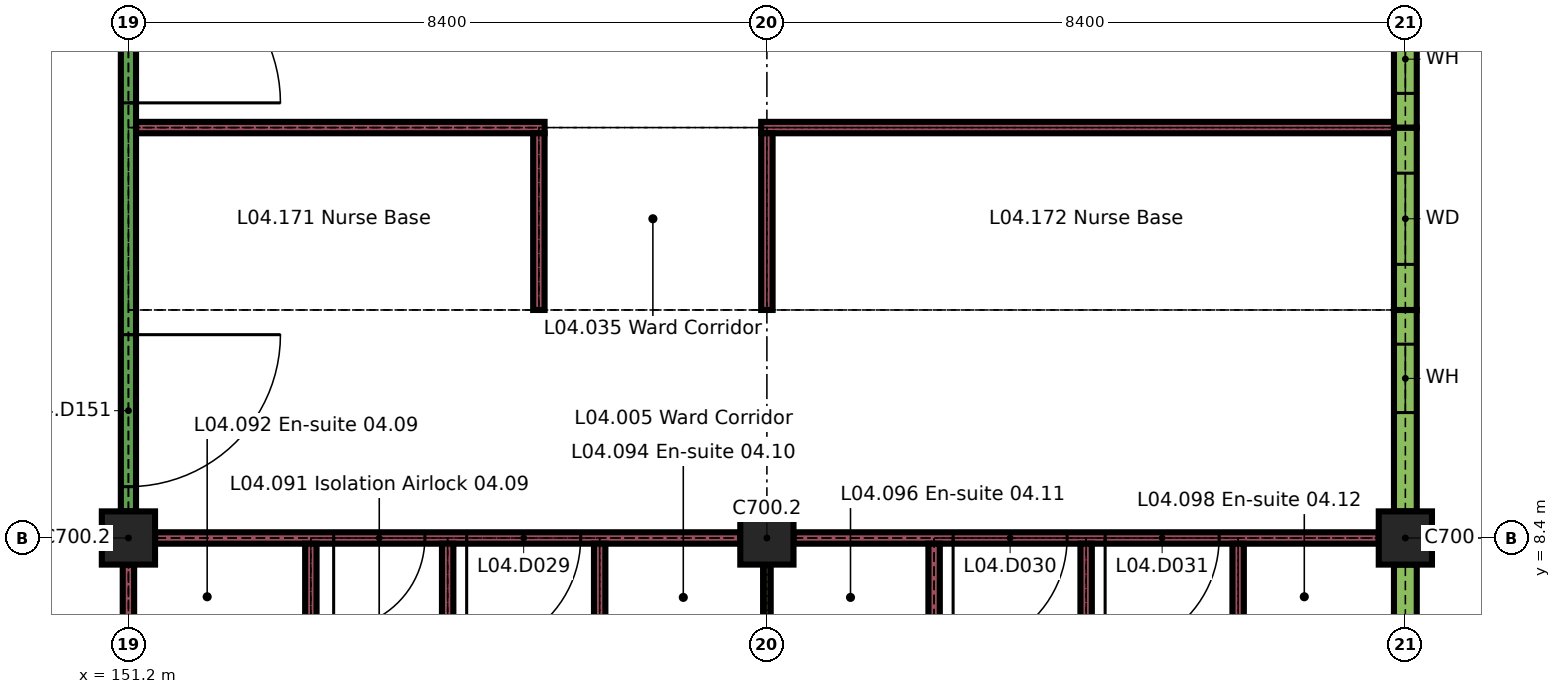
"""IFC4 building model, lengths in metres.
Left out: names, types, materials, properties, quantities, classifications, styles, units other than length and angle.
Written with IfcOpenShell. Run it as: python <this file> out.ifc"""

import sys

from ifc_helpers import new_model, si_unit, direction, frame, frame_2d, origin, origin_2d, place, context, subcontext, project, spatial, rectangle, extrude, element, fill, save


model = new_model("IFC4")
c1 = context("Model", 3, precision=1e-05, world=origin(), true_north=direction((0.0, 1.0)))
c2 = subcontext(c1, "Body", "Model", "MODEL_VIEW")
j1 = project(units=[si_unit("LENGTHUNIT", "METRE"), si_unit("PLANEANGLEUNIT", "RADIAN")], contexts=[c1])
p1 = place(None, origin())
s1 = spatial("IfcSite", under=j1, at=p1, CompositionType="ELEMENT")
p2 = place(p1, origin())
s2 = spatial("IfcBuilding", under=s1, at=p2, CompositionType="ELEMENT")
p3 = place(p2, frame((0.0, 0.0, 18.9)))
s3 = spatial("IfcBuildingStorey", under=s2, at=p3, CompositionType="ELEMENT", Elevation=18.9)
for number, where, z_axis, x_axis in (
    (1, (151.2, 8.4, 0.0), (0.0, 0.0, 1.0), (1.0, 0.0, 0.0)),
    (2, (159.6, 8.4, 0.0), (0.0, 0.0, 1.0), (1.0, 0.0, 0.0)),
    (3, (168.0, 8.4, 0.0), (0.0, 0.0, 1.0), (1.0, 0.0, 0.0)),
):
    element("IfcColumn", number, at=place(p3, frame(where, z_axis=z_axis, x_axis=x_axis)), inside=s3, PredefinedType="COLUMN", context=c2, shape_type="SweptSolid", body=[
        extrude(rectangle(XDim=0.7, YDim=0.7, at=origin_2d()), origin(), (0.0, 0.0, 1.0), 3.26),
    ])
p4 = place(p3, frame((168.0, 6.0, 0.0), z_axis=(0.0, 0.0, 1.0), x_axis=(0.0, 1.0, 0.0)))
e4 = element("IfcWall", 4, at=p4, inside=s3, PredefinedType="SOLIDWALL", context=c2, shape_type="SweptSolid", body=[
    extrude(rectangle(XDim=2.05, YDim=0.3, at=frame_2d((1.025, 0.0))), origin(), (0.0, 0.0, 1.0), 2.96),
])
p5 = place(p3, frame((168.0, 8.75, 0.0), z_axis=(0.0, 0.0, 1.0), x_axis=(0.0, 1.0, 0.0)))
e5 = element("IfcWall", 5, at=p5, inside=s3, PredefinedType="SOLIDWALL", context=c2, shape_type="SweptSolid", body=[
    extrude(rectangle(XDim=2.65, YDim=0.3, at=frame_2d((1.325, 0.0))), origin(), (0.0, 0.0, 1.0), 2.96),
])
p6 = place(p5, frame((1.3, 0.0, 0.9)))
e6 = element("IfcOpeningElement", 6, at=p6, cuts=e5, PredefinedType="OPENING", context=c2, shape_type="SweptSolid", body=[
    extrude(rectangle(XDim=0.9, YDim=1.5, at=frame_2d((0.45, 0.75))), frame((0.0, 0.16, 0.0), z_axis=(0.0, -1.0, 0.0), x_axis=(1.0, 0.0, 0.0)), (0.0, 0.0, 1.0), 0.32),
])
p7 = place(p3, frame((168.0, 11.4, 0.0), z_axis=(0.0, 0.0, 1.0), x_axis=(0.0, 1.0, 0.0)))
e7 = element("IfcWall", 7, at=p7, inside=s3, PredefinedType="SOLIDWALL", context=c2, shape_type="SweptSolid", body=[
    extrude(rectangle(XDim=2.4, YDim=0.3, at=frame_2d((1.2, 0.0))), origin(), (0.0, 0.0, 1.0), 2.96),
])
p8 = place(p7, frame((0.6, 0.0, 0.9)))
e8 = element("IfcOpeningElement", 8, at=p8, cuts=e7, PredefinedType="OPENING", context=c2, shape_type="SweptSolid", body=[
    extrude(rectangle(XDim=1.2, YDim=1.5, at=frame_2d((0.6, 0.75))), frame((0.0, 0.16, 0.0), z_axis=(0.0, -1.0, 0.0), x_axis=(1.0, 0.0, 0.0)), (0.0, 0.0, 1.0), 0.32),
])
p9 = place(p3, frame((168.0, 13.8, 0.0), z_axis=(0.0, 0.0, 1.0), x_axis=(0.0, 1.0, 0.0)))
e9 = element("IfcWall", 9, at=p9, inside=s3, PredefinedType="SOLIDWALL", context=c2, shape_type="SweptSolid", body=[
    extrude(rectangle(XDim=3.0, YDim=0.3, at=frame_2d((1.5, 0.0))), origin(), (0.0, 0.0, 1.0), 2.96),
])
p10 = place(p9, frame((0.45, 0.0, 0.9)))
e10 = element("IfcOpeningElement", 10, at=p10, cuts=e9, PredefinedType="OPENING", context=c2, shape_type="SweptSolid", body=[
    extrude(rectangle(XDim=0.9, YDim=1.5, at=frame_2d((0.45, 0.75))), frame((0.0, 0.16, 0.0), z_axis=(0.0, -1.0, 0.0), x_axis=(1.0, 0.0, 0.0)), (0.0, 0.0, 1.0), 0.32),
])
p11 = place(p3, frame((151.55, 8.4, 0.0), z_axis=(0.0, 0.0, 1.0), x_axis=(1.0, 0.0, 0.0)))
e11 = element("IfcWall", 11, at=p11, inside=s3, PredefinedType="PARTITIONING", context=c2, shape_type="SweptSolid", body=[
    extrude(rectangle(XDim=7.7, YDim=0.15, at=frame_2d((3.85, 0.0))), origin(), (0.0, 0.0, 1.0), 3.26),
])
p12 = place(p11, frame((2.35, 0.0, 0.0)))
e12 = element("IfcOpeningElement", 12, at=p12, cuts=e11, PredefinedType="OPENING", context=c2, shape_type="SweptSolid", body=[
    extrude(rectangle(XDim=1.2, YDim=2.1, at=frame_2d((0.6, 1.05))), frame((0.0, 0.085, 0.0), z_axis=(0.0, -1.0, 0.0), x_axis=(1.0, 0.0, 0.0)), (0.0, 0.0, 1.0), 0.17),
])
p13 = place(p11, frame((4.1, 0.0, 0.0)))
e13 = element("IfcOpeningElement", 13, at=p13, cuts=e11, PredefinedType="OPENING", context=c2, shape_type="SweptSolid", body=[
    extrude(rectangle(XDim=1.5, YDim=2.4, at=frame_2d((0.75, 1.2))), frame((0.0, 0.085, 0.0), z_axis=(0.0, -1.0, 0.0), x_axis=(1.0, 0.0, 0.0)), (0.0, 0.0, 1.0), 0.17),
])
p14 = place(p3, frame((159.95, 8.4, 0.0), z_axis=(0.0, 0.0, 1.0), x_axis=(1.0, 0.0, 0.0)))
e14 = element("IfcWall", 14, at=p14, inside=s3, PredefinedType="PARTITIONING", context=c2, shape_type="SweptSolid", body=[
    extrude(rectangle(XDim=7.7, YDim=0.15, at=frame_2d((3.85, 0.0))), origin(), (0.0, 0.0, 1.0), 3.26),
])
p15 = place(p14, frame((2.1, 0.0, 0.0)))
e15 = element("IfcOpeningElement", 15, at=p15, cuts=e14, PredefinedType="OPENING", context=c2, shape_type="SweptSolid", body=[
    extrude(rectangle(XDim=1.5, YDim=2.4, at=frame_2d((0.75, 1.2))), frame((0.0, 0.085, 0.0), z_axis=(0.0, -1.0, 0.0), x_axis=(1.0, 0.0, 0.0)), (0.0, 0.0, 1.0), 0.17),
])
p16 = place(p14, frame((4.1, 0.0, 0.0)))
e16 = element("IfcOpeningElement", 16, at=p16, cuts=e14, PredefinedType="OPENING", context=c2, shape_type="SweptSolid", body=[
    extrude(rectangle(XDim=1.5, YDim=2.4, at=frame_2d((0.75, 1.2))), frame((0.0, 0.085, 0.0), z_axis=(0.0, -1.0, 0.0), x_axis=(1.0, 0.0, 0.0)), (0.0, 0.0, 1.0), 0.17),
])
p17 = place(p3, frame((151.3, 13.8, 0.0), z_axis=(0.0, 0.0, 1.0), x_axis=(1.0, 0.0, 0.0)))
e17 = element("IfcWall", 17, at=p17, inside=s3, PredefinedType="PARTITIONING", context=c2, shape_type="SweptSolid", body=[
    extrude(rectangle(XDim=5.375, YDim=0.15, at=frame_2d((2.688, 0.0))), origin(), (0.0, 0.0, 1.0), 3.26),
])
p18 = place(p3, frame((159.525, 13.8, 0.0), z_axis=(0.0, 0.0, 1.0), x_axis=(1.0, 0.0, 0.0)))
e18 = element("IfcWall", 18, at=p18, inside=s3, PredefinedType="PARTITIONING", context=c2, shape_type="SweptSolid", body=[
    extrude(rectangle(XDim=8.325, YDim=0.15, at=frame_2d((4.163, 0.0))), origin(), (0.0, 0.0, 1.0), 3.26),
])
p19 = place(p3, frame((151.2, 0.35, 0.0), z_axis=(0.0, 0.0, 1.0), x_axis=(0.0, 1.0, 0.0)))
e19 = element("IfcWall", 19, at=p19, inside=s3, PredefinedType="PARTITIONING", context=c2, shape_type="SweptSolid", body=[
    extrude(rectangle(XDim=7.7, YDim=0.15, at=frame_2d((3.85, 0.0))), origin(), (0.0, 0.0, 1.0), 3.26),
])
p20 = place(p3, frame((151.2, 8.75, 0.0), z_axis=(0.0, 0.0, 1.0), x_axis=(0.0, 1.0, 0.0)))
e20 = element("IfcWall", 20, at=p20, inside=s3, PredefinedType="PARTITIONING", context=c2, shape_type="SweptSolid", body=[
    extrude(rectangle(XDim=7.7, YDim=0.2, at=frame_2d((3.85, 0.0))), origin(), (0.0, 0.0, 1.0), 3.26),
])
p21 = place(p20, frame((0.325, 0.0, 0.0)))
e21 = element("IfcOpeningElement", 21, at=p21, cuts=e20, PredefinedType="OPENING", context=c2, shape_type="SweptSolid", body=[
    extrude(rectangle(XDim=2.0, YDim=2.4, at=frame_2d((1.0, 1.2))), frame((0.0, 0.11, 0.0), z_axis=(0.0, -1.0, 0.0), x_axis=(1.0, 0.0, 0.0)), (0.0, 0.0, 1.0), 0.22),
])
p22 = place(p20, frame((5.375, 0.0, 0.0)))
e22 = element("IfcOpeningElement", 22, at=p22, cuts=e20, PredefinedType="OPENING", context=c2, shape_type="SweptSolid", body=[
    extrude(rectangle(XDim=2.0, YDim=2.4, at=frame_2d((1.0, 1.2))), frame((0.0, 0.11, 0.0), z_axis=(0.0, -1.0, 0.0), x_axis=(1.0, 0.0, 0.0)), (0.0, 0.0, 1.0), 0.22),
])
p23 = place(p3, frame((153.6, 6.075, 0.0), z_axis=(0.0, 0.0, 1.0), x_axis=(0.0, 1.0, 0.0)))
e23 = element("IfcWall", 23, at=p23, inside=s3, PredefinedType="PARTITIONING", context=c2, shape_type="SweptSolid", body=[
    extrude(rectangle(XDim=2.25, YDim=0.15, at=frame_2d((1.125, 0.0))), origin(), (0.0, 0.0, 1.0), 3.26),
])
p24 = place(p3, frame((155.4, 0.15, 0.0), z_axis=(0.0, 0.0, 1.0), x_axis=(0.0, 1.0, 0.0)))
e24 = element("IfcWall", 24, at=p24, inside=s3, PredefinedType="PARTITIONING", context=c2, shape_type="SweptSolid", body=[
    extrude(rectangle(XDim=8.175, YDim=0.15, at=frame_2d((4.087, 0.0))), origin(), (0.0, 0.0, 1.0), 3.26),
])
p25 = place(p3, frame((156.6, 11.4, 0.0), z_axis=(0.0, 0.0, 1.0), x_axis=(0.0, 1.0, 0.0)))
e25 = element("IfcWall", 25, at=p25, inside=s3, PredefinedType="PARTITIONING", context=c2, shape_type="SweptSolid", body=[
    extrude(rectangle(XDim=2.325, YDim=0.15, at=frame_2d((1.163, 0.0))), origin(), (0.0, 0.0, 1.0), 3.26),
])
p26 = place(p3, frame((157.4, 6.075, 0.0), z_axis=(0.0, 0.0, 1.0), x_axis=(0.0, 1.0, 0.0)))
e26 = element("IfcWall", 26, at=p26, inside=s3, PredefinedType="PARTITIONING", context=c2, shape_type="SweptSolid", body=[
    extrude(rectangle(XDim=2.25, YDim=0.15, at=frame_2d((1.125, 0.0))), origin(), (0.0, 0.0, 1.0), 3.26),
])
p27 = place(p3, frame((159.6, 6.075, 0.0), z_axis=(0.0, 0.0, 1.0), x_axis=(0.0, 1.0, 0.0)))
e27 = element("IfcWall", 27, at=p27, inside=s3, PredefinedType="PARTITIONING", context=c2, shape_type="SweptSolid", body=[
    extrude(rectangle(XDim=1.975, YDim=0.1, at=frame_2d((0.988, 0.0))), origin(), (0.0, 0.0, 1.0), 3.26),
])
p28 = place(p3, frame((159.6, 11.4, 0.0), z_axis=(0.0, 0.0, 1.0), x_axis=(0.0, 1.0, 0.0)))
e28 = element("IfcWall", 28, at=p28, inside=s3, PredefinedType="PARTITIONING", context=c2, shape_type="SweptSolid", body=[
    extrude(rectangle(XDim=2.325, YDim=0.15, at=frame_2d((1.163, 0.0))), origin(), (0.0, 0.0, 1.0), 3.26),
])
p29 = place(p3, frame((161.8, 6.075, 0.0), z_axis=(0.0, 0.0, 1.0), x_axis=(0.0, 1.0, 0.0)))
e29 = element("IfcWall", 29, at=p29, inside=s3, PredefinedType="PARTITIONING", context=c2, shape_type="SweptSolid", body=[
    extrude(rectangle(XDim=2.25, YDim=0.15, at=frame_2d((1.125, 0.0))), origin(), (0.0, 0.0, 1.0), 3.26),
])
p30 = place(p3, frame((163.8, 0.15, 0.0), z_axis=(0.0, 0.0, 1.0), x_axis=(0.0, 1.0, 0.0)))
e30 = element("IfcWall", 30, at=p30, inside=s3, PredefinedType="PARTITIONING", context=c2, shape_type="SweptSolid", body=[
    extrude(rectangle(XDim=8.175, YDim=0.15, at=frame_2d((4.087, 0.0))), origin(), (0.0, 0.0, 1.0), 3.26),
])
p31 = place(p3, frame((165.8, 6.075, 0.0), z_axis=(0.0, 0.0, 1.0), x_axis=(0.0, 1.0, 0.0)))
e31 = element("IfcWall", 31, at=p31, inside=s3, PredefinedType="PARTITIONING", context=c2, shape_type="SweptSolid", body=[
    extrude(rectangle(XDim=2.25, YDim=0.15, at=frame_2d((1.125, 0.0))), origin(), (0.0, 0.0, 1.0), 3.26),
])
p32 = place(p6, origin())
e32 = element("IfcWindow", 32, at=p32, inside=s3, PartitioningType="SINGLE_PANEL", PredefinedType="WINDOW", context=c2, shape_type="SweptSolid", body=[
    extrude(rectangle(XDim=0.9, YDim=1.5, at=frame_2d((0.45, 0.75))), frame((0.0, 0.03, 0.0), z_axis=(0.0, -1.0, 0.0), x_axis=(1.0, 0.0, 0.0)), (0.0, 0.0, 1.0), 0.06),
])
fill(e6, e32)
p33 = place(p8, origin())
e33 = element("IfcWindow", 33, at=p33, inside=s3, PartitioningType="SINGLE_PANEL", PredefinedType="WINDOW", context=c2, shape_type="SweptSolid", body=[
    extrude(rectangle(XDim=1.2, YDim=1.5, at=frame_2d((0.6, 0.75))), frame((0.0, 0.03, 0.0), z_axis=(0.0, -1.0, 0.0), x_axis=(1.0, 0.0, 0.0)), (0.0, 0.0, 1.0), 0.06),
])
fill(e8, e33)
p34 = place(p10, origin())
e34 = element("IfcWindow", 34, at=p34, inside=s3, PartitioningType="SINGLE_PANEL", PredefinedType="WINDOW", context=c2, shape_type="SweptSolid", body=[
    extrude(rectangle(XDim=0.9, YDim=1.5, at=frame_2d((0.45, 0.75))), frame((0.0, 0.03, 0.0), z_axis=(0.0, -1.0, 0.0), x_axis=(1.0, 0.0, 0.0)), (0.0, 0.0, 1.0), 0.06),
])
fill(e10, e34)
p35 = place(p12, origin())
e35 = element("IfcDoor", 35, at=p35, inside=s3, OperationType="SINGLE_SWING_LEFT", PredefinedType="DOOR", context=c2, shape_type="SweptSolid", body=[
    extrude(rectangle(XDim=1.2, YDim=2.1, at=frame_2d((0.6, 1.05))), frame((0.0, 0.05, 0.0), z_axis=(0.0, -1.0, 0.0), x_axis=(1.0, 0.0, 0.0)), (0.0, 0.0, 1.0), 0.1),
])
fill(e12, e35)
p36 = place(p13, origin())
e36 = element("IfcDoor", 36, at=p36, inside=s3, OperationType="SINGLE_SWING_LEFT", PredefinedType="DOOR", context=c2, shape_type="SweptSolid", body=[
    extrude(rectangle(XDim=1.5, YDim=2.4, at=frame_2d((0.75, 1.2))), frame((0.0, 0.03, 0.0), z_axis=(0.0, -1.0, 0.0), x_axis=(1.0, 0.0, 0.0)), (0.0, 0.0, 1.0), 0.06),
])
fill(e13, e36)
p37 = place(p15, origin())
e37 = element("IfcDoor", 37, at=p37, inside=s3, OperationType="SINGLE_SWING_LEFT", PredefinedType="DOOR", context=c2, shape_type="SweptSolid", body=[
    extrude(rectangle(XDim=1.5, YDim=2.4, at=frame_2d((0.75, 1.2))), frame((0.0, 0.03, 0.0), z_axis=(0.0, -1.0, 0.0), x_axis=(1.0, 0.0, 0.0)), (0.0, 0.0, 1.0), 0.06),
])
fill(e15, e37)
p38 = place(p16, origin())
e38 = element("IfcDoor", 38, at=p38, inside=s3, OperationType="SINGLE_SWING_LEFT", PredefinedType="DOOR", context=c2, shape_type="SweptSolid", body=[
    extrude(rectangle(XDim=1.5, YDim=2.4, at=frame_2d((0.75, 1.2))), frame((0.0, 0.03, 0.0), z_axis=(0.0, -1.0, 0.0), x_axis=(1.0, 0.0, 0.0)), (0.0, 0.0, 1.0), 0.06),
])
fill(e16, e38)
p39 = place(p21, origin())
e39 = element("IfcDoor", 39, at=p39, inside=s3, OperationType="SINGLE_SWING_RIGHT", PredefinedType="DOOR", context=c2, shape_type="SweptSolid", body=[
    extrude(rectangle(XDim=2.0, YDim=2.4, at=frame_2d((1.0, 1.2))), frame((0.0, 0.03, 0.0), z_axis=(0.0, -1.0, 0.0), x_axis=(1.0, 0.0, 0.0)), (0.0, 0.0, 1.0), 0.06),
])
fill(e21, e39)
p40 = place(p22, origin())
e40 = element("IfcDoor", 40, at=p40, inside=s3, OperationType="SINGLE_SWING_LEFT", PredefinedType="DOOR", context=c2, shape_type="SweptSolid", body=[
    extrude(rectangle(XDim=2.0, YDim=2.4, at=frame_2d((1.0, 1.2))), frame((0.0, 0.03, 0.0), z_axis=(0.0, -1.0, 0.0), x_axis=(1.0, 0.0, 0.0)), (0.0, 0.0, 1.0), 0.06),
])
fill(e22, e40)
save(model, sys.argv[1])
